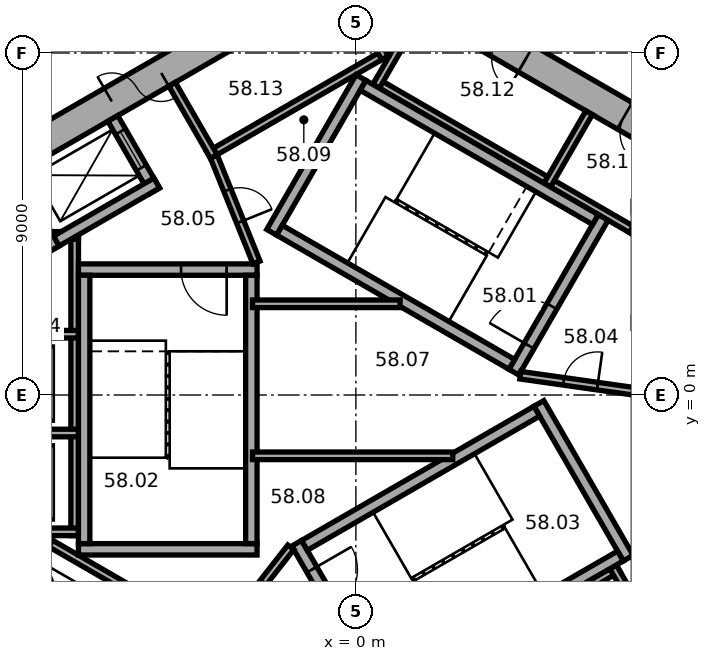
"""IFC4 building model, lengths in metres.
Left out: names, types, materials, properties, quantities, classifications, styles, units other than length and angle.
Written with IfcOpenShell. Run it as: python <this file> out.ifc"""

import sys

from ifc_helpers import new_model, si_unit, direction, frame, frame_2d, origin, place, context, subcontext, project, spatial, rectangle, extrude, element, fill, save


model = new_model("IFC4")
c1 = context("Model", 3, precision=1e-05, world=origin(), true_north=direction((0.0, 1.0)))
c2 = subcontext(c1, "Body", "Model", "MODEL_VIEW")
j1 = project(units=[si_unit("LENGTHUNIT", "METRE"), si_unit("PLANEANGLEUNIT", "RADIAN")], contexts=[c1])
p1 = place(None, origin())
s1 = spatial("IfcSite", under=j1, at=p1, CompositionType="ELEMENT")
p2 = place(p1, origin())
s2 = spatial("IfcBuilding", under=s1, at=p2, CompositionType="ELEMENT")
p3 = place(p2, frame((0.0, 0.0, 236.5)))
s3 = spatial("IfcBuildingStorey", under=s2, at=p3, CompositionType="ELEMENT", Elevation=236.5)
p4 = place(p3, frame((10.1, 5.6, 0.0), z_axis=(0.0, 0.0, 1.0), x_axis=(-0.866023897231, 0.500002609418, 0.0)))
e1 = element("IfcWall", 1, at=p4, inside=s3, PredefinedType="SHEAR", context=c2, shape_type="SweptSolid", body=[
    extrude(rectangle(XDim=11.894, YDim=0.8, at=frame_2d((5.947, 0.0))), origin(), (0.0, 0.0, 1.0), 3.7),
])
p5 = place(p4, frame((2.597, 0.0, 0.0)))
e2 = element("IfcOpeningElement", 2, at=p5, cuts=e1, PredefinedType="OPENING", context=c2, shape_type="SweptSolid", body=[
    extrude(rectangle(XDim=0.9, YDim=2.1, at=frame_2d((0.45, 1.05))), frame((0.0, 0.41, 0.0), z_axis=(0.0, -1.0, 0.0), x_axis=(1.0, 0.0, 0.0)), (0.0, 0.0, 1.0), 0.82),
])
p6 = place(p4, frame((6.497, 0.0, 0.0)))
e3 = element("IfcOpeningElement", 3, at=p6, cuts=e1, PredefinedType="OPENING", context=c2, shape_type="SweptSolid", body=[
    extrude(rectangle(XDim=0.9, YDim=2.1, at=frame_2d((0.45, 1.05))), frame((0.0, 0.41, 0.0), z_axis=(0.0, -1.0, 0.0), x_axis=(1.0, 0.0, 0.0)), (0.0, 0.0, 1.0), 0.82),
])
p7 = place(p3, frame((0.2, 11.547, 0.0), z_axis=(0.0, 0.0, 1.0), x_axis=(-0.866023897231, -0.500002609418, 0.0)))
e4 = element("IfcWall", 4, at=p7, inside=s3, PredefinedType="SHEAR", context=c2, shape_type="SweptSolid", body=[
    extrude(rectangle(XDim=11.894, YDim=0.8, at=frame_2d((5.947, 0.0))), origin(), (0.0, 0.0, 1.0), 3.7),
])
p8 = place(p7, frame((6.147, 0.0, 0.0)))
e5 = element("IfcOpeningElement", 5, at=p8, cuts=e4, PredefinedType="OPENING", context=c2, shape_type="SweptSolid", body=[
    extrude(rectangle(XDim=1.5, YDim=2.1, at=frame_2d((0.75, 1.05))), frame((0.0, 0.41, 0.0), z_axis=(0.0, -1.0, 0.0), x_axis=(1.0, 0.0, 0.0)), (0.0, 0.0, 1.0), 0.82),
])
p9 = place(p7, frame((2.997, 0.0, 0.0)))
e6 = element("IfcOpeningElement", 6, at=p9, cuts=e4, PredefinedType="OPENING", context=c2, shape_type="SweptSolid", body=[
    extrude(rectangle(XDim=0.9, YDim=2.1, at=frame_2d((0.45, 1.05))), frame((0.0, 0.41, 0.0), z_axis=(0.0, -1.0, 0.0), x_axis=(1.0, 0.0, 0.0)), (0.0, 0.0, 1.0), 0.82),
])
p10 = place(p3, frame((7.424, 4.259, 0.0), z_axis=(0.0, 0.0, 1.0), x_axis=(-0.866026010844, 0.49999894854, 0.0)))
e7 = element("IfcWall", 7, at=p10, inside=s3, PredefinedType="PARTITIONING", context=c2, shape_type="SweptSolid", body=[
    extrude(rectangle(XDim=8.0, YDim=0.2, at=frame_2d((4.0, 0.0))), origin(), (0.0, 0.0, 1.0), 3.42),
])
for number, where, z_axis, x_axis in (
    (8, (7.287, 4.222, 0.0), (0.0, 0.0, 1.0), (0.5, 0.866, 0.0)),
    (9, (5.036, 5.522, 0.0), (0.0, 0.0, 1.0), (0.5, 0.866, 0.0)),
    (10, (0.532, 8.122, 0.0), (0.0, 0.0, 1.0), (0.5, 0.866, 0.0)),
):
    element("IfcWall", number, at=place(p3, frame(where, z_axis=z_axis, x_axis=x_axis)), inside=s3, PredefinedType="PARTITIONING", context=c2, shape_type="SweptSolid", body=[
        extrude(rectangle(XDim=2.2, YDim=0.2, at=frame_2d((1.1, 0.0))), origin(), (0.0, 0.0, 1.0), 3.42),
    ])
p11 = place(p3, frame((0.803, 9.009, 0.0), z_axis=(0.0, 0.0, 1.0), x_axis=(-0.866028230842, -0.499995103361, 0.0)))
e11 = element("IfcWall", 11, at=p11, inside=s3, PredefinedType="PARTITIONING", context=c2, shape_type="SweptSolid", body=[
    extrude(rectangle(XDim=5.4, YDim=0.2, at=frame_2d((2.7, 0.0))), origin(), (0.0, 0.0, 1.0), 3.42),
])
p12 = place(p3, frame((0.767, 8.872, 0.0), z_axis=(0.0, 0.0, 1.0), x_axis=(-0.499994660107, 0.866028486751, 0.0)))
e12 = element("IfcWall", 12, at=p12, inside=s3, PredefinedType="PARTITIONING", context=c2, shape_type="SweptSolid", body=[
    extrude(rectangle(XDim=2.2, YDim=0.2, at=frame_2d((1.1, 0.0))), origin(), (0.0, 0.0, 1.0), 3.42),
])
p13 = place(p3, frame((-3.737, 6.272, 0.0), z_axis=(0.0, 0.0, 1.0), x_axis=(-0.50002983664, 0.866008176907, 0.0)))
e13 = element("IfcWall", 13, at=p13, inside=s3, PredefinedType="PARTITIONING", context=c2, shape_type="SweptSolid", body=[
    extrude(rectangle(XDim=2.2, YDim=0.2, at=frame_2d((1.1, 0.0))), origin(), (0.0, 0.0, 1.0), 3.42),
])
p14 = place(p3, frame((-7.4, 4.3, 0.0), z_axis=(0.0, 0.0, 1.0), x_axis=(0.0, -1.0, 0.0)))
e14 = element("IfcWall", 14, at=p14, inside=s3, PredefinedType="PARTITIONING", context=c2, shape_type="SweptSolid", body=[
    extrude(rectangle(XDim=8.0, YDim=0.2, at=frame_2d((4.0, 0.0))), origin(), (0.0, 0.0, 1.0), 3.42),
])
for number, where, z_axis, x_axis in (
    (15, (-7.3, 4.2, 0.0), (0.0, 0.0, 1.0), (-1.0, 0.0, 0.0)),
    (16, (-7.3, 1.6, 0.0), (0.0, 0.0, 1.0), (-1.0, 0.0, 0.0)),
    (17, (-7.3, -1.0, 0.0), (0.0, 0.0, 1.0), (-1.0, 0.0, 0.0)),
    (18, (-7.3, -3.6, 0.0), (0.0, 0.0, 1.0), (-1.0, 0.0, 0.0)),
):
    element("IfcWall", number, at=place(p3, frame(where, z_axis=z_axis, x_axis=x_axis)), inside=s3, PredefinedType="PARTITIONING", context=c2, shape_type="SweptSolid", body=[
        extrude(rectangle(XDim=2.2, YDim=0.2, at=frame_2d((1.1, 0.0))), origin(), (0.0, 0.0, 1.0), 3.42),
    ])
p15 = place(p3, frame((-8.203, -3.809, 0.0), z_axis=(0.0, 0.0, 1.0), x_axis=(0.866028230842, -0.499995103361, 0.0)))
e19 = element("IfcWall", 19, at=p15, inside=s3, PredefinedType="PARTITIONING", context=c2, shape_type="SweptSolid", body=[
    extrude(rectangle(XDim=5.4, YDim=0.2, at=frame_2d((2.7, 0.0))), origin(), (0.0, 0.0, 1.0), 3.42),
])
p16 = place(p3, frame((-8.067, -3.772, 0.0), z_axis=(0.0, 0.0, 1.0), x_axis=(-0.50002983664, -0.866008176907, 0.0)))
e20 = element("IfcWall", 20, at=p16, inside=s3, PredefinedType="PARTITIONING", context=c2, shape_type="SweptSolid", body=[
    extrude(rectangle(XDim=2.2, YDim=0.2, at=frame_2d((1.1, 0.0))), origin(), (0.0, 0.0, 1.0), 3.42),
])
p17 = place(p3, frame((-0.024, -8.559, 0.0), z_axis=(0.0, 0.0, 1.0), x_axis=(0.866026010844, 0.49999894854, 0.0)))
e21 = element("IfcWall", 21, at=p17, inside=s3, PredefinedType="PARTITIONING", context=c2, shape_type="SweptSolid", body=[
    extrude(rectangle(XDim=8.0, YDim=0.2, at=frame_2d((4.0, 0.0))), origin(), (0.0, 0.0, 1.0), 3.42),
])
p18 = place(p3, frame((6.768, -4.522, 0.0), z_axis=(0.0, 0.0, 1.0), x_axis=(0.50002983664, -0.866008176907, 0.0)))
e22 = element("IfcWall", 22, at=p18, inside=s3, PredefinedType="PARTITIONING", context=c2, shape_type="SweptSolid", body=[
    extrude(rectangle(XDim=2.2, YDim=0.2, at=frame_2d((1.1, 0.0))), origin(), (0.0, 0.0, 1.0), 3.42),
])
p19 = place(p3, frame((4.158, 0.602, 0.0), z_axis=(0.0, 0.0, 1.0), x_axis=(0.499977259774, 0.866038532462, 0.0)))
e23 = element("IfcWall", 23, at=p19, inside=s3, PredefinedType="SHEAR", context=c2, shape_type="SweptSolid", body=[
    extrude(rectangle(XDim=4.7, YDim=0.3, at=frame_2d((2.35, 0.0))), origin(), (0.0, 0.0, 1.0), 3.42),
])
p20 = place(p19, frame((0.8, 0.0, 0.0)))
e24 = element("IfcOpeningElement", 24, at=p20, cuts=e23, PredefinedType="OPENING", context=c2, shape_type="SweptSolid", body=[
    extrude(rectangle(XDim=1.2, YDim=2.1, at=frame_2d((0.6, 1.05))), frame((0.0, 0.16, 0.0), z_axis=(0.0, -1.0, 0.0), x_axis=(1.0, 0.0, 0.0)), (0.0, 0.0, 1.0), 0.32),
])
p21 = place(p3, frame((-2.216, 4.282, 0.0), z_axis=(0.0, 0.0, 1.0), x_axis=(0.499977259774, 0.866038532462, 0.0)))
e25 = element("IfcWall", 25, at=p21, inside=s3, PredefinedType="SHEAR", context=c2, shape_type="SweptSolid", body=[
    extrude(rectangle(XDim=4.7, YDim=0.3, at=frame_2d((2.35, 0.0))), origin(), (0.0, 0.0, 1.0), 3.42),
])
for number, where, z_axis, x_axis in (
    (26, (4.103, 0.807, 0.0), (0.0, 0.0, 1.0), (-0.866, 0.5, 0.0)),
    (27, (6.303, 4.617, 0.0), (0.0, 0.0, 1.0), (-0.866, 0.5, 0.0)),
):
    element("IfcWall", number, at=place(p3, frame(where, z_axis=z_axis, x_axis=x_axis)), inside=s3, PredefinedType="SHEAR", context=c2, shape_type="SweptSolid", body=[
        extrude(rectangle(XDim=7.06, YDim=0.3, at=frame_2d((3.53, 0.0))), origin(), (0.0, 0.0, 1.0), 3.42),
    ])
p22 = place(p3, frame((-2.6, 3.3, 0.0), z_axis=(0.0, 0.0, 1.0), x_axis=(-1.0, 0.0, 0.0)))
e28 = element("IfcWall", 28, at=p22, inside=s3, PredefinedType="SHEAR", context=c2, shape_type="SweptSolid", body=[
    extrude(rectangle(XDim=4.7, YDim=0.3, at=frame_2d((2.35, 0.0))), origin(), (0.0, 0.0, 1.0), 3.42),
])
p23 = place(p22, frame((0.8, 0.0, 0.0)))
e29 = element("IfcOpeningElement", 29, at=p23, cuts=e28, PredefinedType="OPENING", context=c2, shape_type="SweptSolid", body=[
    extrude(rectangle(XDim=1.2, YDim=2.1, at=frame_2d((0.6, 1.05))), frame((0.0, 0.16, 0.0), z_axis=(0.0, -1.0, 0.0), x_axis=(1.0, 0.0, 0.0)), (0.0, 0.0, 1.0), 0.32),
])
p24 = place(p3, frame((-2.6, -4.06, 0.0), z_axis=(0.0, 0.0, 1.0), x_axis=(-1.0, 0.0, 0.0)))
e30 = element("IfcWall", 30, at=p24, inside=s3, PredefinedType="SHEAR", context=c2, shape_type="SweptSolid", body=[
    extrude(rectangle(XDim=4.7, YDim=0.3, at=frame_2d((2.35, 0.0))), origin(), (0.0, 0.0, 1.0), 3.42),
])
for number, where, z_axis, x_axis in (
    (31, (-2.75, 3.15, 0.0), (0.0, 0.0, 1.0), (0.0, -1.0, 0.0)),
    (32, (-7.15, 3.15, 0.0), (0.0, 0.0, 1.0), (0.0, -1.0, 0.0)),
):
    element("IfcWall", number, at=place(p3, frame(where, z_axis=z_axis, x_axis=x_axis)), inside=s3, PredefinedType="SHEAR", context=c2, shape_type="SweptSolid", body=[
        extrude(rectangle(XDim=7.06, YDim=0.3, at=frame_2d((3.53, 0.0))), origin(), (0.0, 0.0, 1.0), 3.42),
    ])
p25 = place(p3, frame((-1.558, -3.902, 0.0), z_axis=(0.0, 0.0, 1.0), x_axis=(0.499977259774, -0.866038532462, 0.0)))
e33 = element("IfcWall", 33, at=p25, inside=s3, PredefinedType="SHEAR", context=c2, shape_type="SweptSolid", body=[
    extrude(rectangle(XDim=4.7, YDim=0.3, at=frame_2d((2.35, 0.0))), origin(), (0.0, 0.0, 1.0), 3.42),
])
p26 = place(p25, frame((0.8, 0.0, 0.0)))
e34 = element("IfcOpeningElement", 34, at=p26, cuts=e33, PredefinedType="OPENING", context=c2, shape_type="SweptSolid", body=[
    extrude(rectangle(XDim=1.2, YDim=2.1, at=frame_2d((0.6, 1.05))), frame((0.0, 0.16, 0.0), z_axis=(0.0, -1.0, 0.0), x_axis=(1.0, 0.0, 0.0)), (0.0, 0.0, 1.0), 0.32),
])
p27 = place(p3, frame((4.816, -0.222, 0.0), z_axis=(0.0, 0.0, 1.0), x_axis=(0.499977259774, -0.866038532462, 0.0)))
e35 = element("IfcWall", 35, at=p27, inside=s3, PredefinedType="SHEAR", context=c2, shape_type="SweptSolid", body=[
    extrude(rectangle(XDim=4.7, YDim=0.3, at=frame_2d((2.35, 0.0))), origin(), (0.0, 0.0, 1.0), 3.42),
])
for number, where, z_axis, x_axis in (
    (36, (-1.353, -3.957, 0.0), (0.0, 0.0, 1.0), (0.866, 0.5, 0.0)),
    (37, (0.847, -7.767, 0.0), (0.0, 0.0, 1.0), (0.866, 0.5, 0.0)),
):
    element("IfcWall", number, at=place(p3, frame(where, z_axis=z_axis, x_axis=x_axis)), inside=s3, PredefinedType="SHEAR", context=c2, shape_type="SweptSolid", body=[
        extrude(rectangle(XDim=7.06, YDim=0.3, at=frame_2d((3.53, 0.0))), origin(), (0.0, 0.0, 1.0), 3.42),
    ])
p28 = place(p3, frame((4.327, 0.521, 0.0), z_axis=(0.0, 0.0, 1.0), x_axis=(0.990124376366, -0.14019172346, 0.0)))
e38 = element("IfcWall", 38, at=p28, inside=s3, PredefinedType="PARTITIONING", context=c2, shape_type="SweptSolid", body=[
    extrude(rectangle(XDim=3.002, YDim=0.2, at=frame_2d((1.501, 0.0))), origin(), (0.0, 0.0, 1.0), 3.42),
])
p29 = place(p28, frame((1.15, 0.0, 0.0)))
e39 = element("IfcOpeningElement", 39, at=p29, cuts=e38, PredefinedType="OPENING", context=c2, shape_type="SweptSolid", body=[
    extrude(rectangle(XDim=0.9, YDim=2.1, at=frame_2d((0.45, 1.05))), frame((0.0, 0.11, 0.0), z_axis=(0.0, -1.0, 0.0), x_axis=(1.0, 0.0, 0.0)), (0.0, 0.0, 1.0), 0.22),
])
p30 = place(p3, frame((-5.295, 5.372, 0.0), z_axis=(0.0, 0.0, 1.0), x_axis=(-0.500077893725, 0.86598042715, 0.0)))
e40 = element("IfcWall", 40, at=p30, inside=s3, PredefinedType="SHEAR", context=c2, shape_type="SweptSolid", body=[
    extrude(rectangle(XDim=2.2, YDim=0.3, at=frame_2d((1.1, 0.0))), origin(), (0.0, 0.0, 1.0), 3.42),
])
p31 = place(p30, frame((0.7, 0.0, 0.0)))
e41 = element("IfcOpeningElement", 41, at=p31, cuts=e40, PredefinedType="OPENING", context=c2, shape_type="SweptSolid", body=[
    extrude(rectangle(XDim=1.1, YDim=2.1, at=frame_2d((0.55, 1.05))), frame((0.0, 0.16, 0.0), z_axis=(0.0, -1.0, 0.0), x_axis=(1.0, 0.0, 0.0)), (0.0, 0.0, 1.0), 0.32),
])
p32 = place(p3, frame((-5.24, 5.577, 0.0), z_axis=(0.0, 0.0, 1.0), x_axis=(-0.866014461049, -0.500018952895, 0.0)))
e42 = element("IfcWall", 42, at=p32, inside=s3, PredefinedType="SHEAR", context=c2, shape_type="SweptSolid", body=[
    extrude(rectangle(XDim=3.35, YDim=0.3, at=frame_2d((1.675, 0.0))), origin(), (0.0, 0.0, 1.0), 3.42),
])
p33 = place(p3, frame((-7.937, 3.847, 0.0), z_axis=(0.0, 0.0, 1.0), x_axis=(-0.50002983664, 0.866008176907, 0.0)))
e43 = element("IfcWall", 43, at=p33, inside=s3, PredefinedType="SHEAR", context=c2, shape_type="SweptSolid", body=[
    extrude(rectangle(XDim=2.2, YDim=0.3, at=frame_2d((1.1, 0.0))), origin(), (0.0, 0.0, 1.0), 3.42),
])
p34 = place(p3, frame((-2.615, 3.487, 0.0), z_axis=(0.0, 0.0, 1.0), x_axis=(-0.373576831041, 0.92759924068, 0.0)))
e44 = element("IfcWall", 44, at=p34, inside=s3, PredefinedType="PARTITIONING", context=c2, shape_type="SweptSolid", body=[
    extrude(rectangle(XDim=3.002, YDim=0.2, at=frame_2d((1.501, 0.0))), origin(), (0.0, 0.0, 1.0), 3.42),
])
p35 = place(p34, frame((1.15, 0.0, 0.0)))
e45 = element("IfcOpeningElement", 45, at=p35, cuts=e44, PredefinedType="OPENING", context=c2, shape_type="SweptSolid", body=[
    extrude(rectangle(XDim=0.9, YDim=2.1, at=frame_2d((0.45, 1.05))), frame((0.0, 0.11, 0.0), z_axis=(0.0, -1.0, 0.0), x_axis=(1.0, 0.0, 0.0)), (0.0, 0.0, 1.0), 0.22),
])
p36 = place(p3, frame((-1.712, -4.008, 0.0), z_axis=(0.0, 0.0, 1.0), x_axis=(-0.616549420702, -0.787316208287, 0.0)))
e46 = element("IfcWall", 46, at=p36, inside=s3, PredefinedType="PARTITIONING", context=c2, shape_type="SweptSolid", body=[
    extrude(rectangle(XDim=3.002, YDim=0.2, at=frame_2d((1.501, 0.0))), origin(), (0.0, 0.0, 1.0), 3.42),
])
p37 = place(p36, frame((1.15, 0.0, 0.0)))
e47 = element("IfcOpeningElement", 47, at=p37, cuts=e46, PredefinedType="OPENING", context=c2, shape_type="SweptSolid", body=[
    extrude(rectangle(XDim=0.9, YDim=2.1, at=frame_2d((0.45, 1.05))), frame((0.0, 0.11, 0.0), z_axis=(0.0, -1.0, 0.0), x_axis=(1.0, 0.0, 0.0)), (0.0, 0.0, 1.0), 0.22),
])
p38 = place(p3, frame((-2.72, -1.6, 0.0), z_axis=(0.0, 0.0, 1.0), x_axis=(1.0, 0.0, 0.0)))
e48 = element("IfcWall", 48, at=p38, inside=s3, PredefinedType="PARTITIONING", context=c2, shape_type="SweptSolid", body=[
    extrude(rectangle(XDim=5.269, YDim=0.2, at=frame_2d((2.634, 0.0))), origin(), (0.0, 0.0, 1.0), 3.42),
])
p39 = place(p3, frame((-2.72, 2.4, 0.0), z_axis=(0.0, 0.0, 1.0), x_axis=(1.0, 0.0, 0.0)))
e49 = element("IfcWall", 49, at=p39, inside=s3, PredefinedType="PARTITIONING", context=c2, shape_type="SweptSolid", body=[
    extrude(rectangle(XDim=3.883, YDim=0.2, at=frame_2d((1.941, 0.0))), origin(), (0.0, 0.0, 1.0), 3.42),
])
p40 = place(p8, origin())
e50 = element("IfcDoor", 50, at=p40, inside=s3, OperationType="DOUBLE_DOOR_SINGLE_SWING", PredefinedType="DOOR", context=c2, shape_type="SweptSolid", body=[
    extrude(rectangle(XDim=1.5, YDim=2.1, at=frame_2d((0.75, 1.05))), frame((0.0, 0.025, 0.0), z_axis=(0.0, -1.0, 0.0), x_axis=(1.0, 0.0, 0.0)), (0.0, 0.0, 1.0), 0.05),
])
fill(e5, e50)
p41 = place(p20, origin())
e51 = element("IfcDoor", 51, at=p41, inside=s3, OperationType="SINGLE_SWING_RIGHT", PredefinedType="DOOR", context=c2, shape_type="SweptSolid", body=[
    extrude(rectangle(XDim=1.2, YDim=2.1, at=frame_2d((0.6, 1.05))), frame((0.0, 0.025, 0.0), z_axis=(0.0, -1.0, 0.0), x_axis=(1.0, 0.0, 0.0)), (0.0, 0.0, 1.0), 0.05),
])
fill(e24, e51)
p42 = place(p23, origin())
e52 = element("IfcDoor", 52, at=p42, inside=s3, OperationType="SINGLE_SWING_RIGHT", PredefinedType="DOOR", context=c2, shape_type="SweptSolid", body=[
    extrude(rectangle(XDim=1.2, YDim=2.1, at=frame_2d((0.6, 1.05))), frame((0.0, 0.025, 0.0), z_axis=(0.0, -1.0, 0.0), x_axis=(1.0, 0.0, 0.0)), (0.0, 0.0, 1.0), 0.05),
])
fill(e29, e52)
p43 = place(p26, origin())
e53 = element("IfcDoor", 53, at=p43, inside=s3, OperationType="SINGLE_SWING_RIGHT", PredefinedType="DOOR", context=c2, shape_type="SweptSolid", body=[
    extrude(rectangle(XDim=1.2, YDim=2.1, at=frame_2d((0.6, 1.05))), frame((0.0, 0.025, 0.0), z_axis=(0.0, -1.0, 0.0), x_axis=(1.0, 0.0, 0.0)), (0.0, 0.0, 1.0), 0.05),
])
fill(e34, e53)
p44 = place(p29, origin())
e54 = element("IfcDoor", 54, at=p44, inside=s3, OperationType="SINGLE_SWING_LEFT", PredefinedType="DOOR", context=c2, shape_type="SweptSolid", body=[
    extrude(rectangle(XDim=0.9, YDim=2.1, at=frame_2d((0.45, 1.05))), frame((0.0, 0.025, 0.0), z_axis=(0.0, -1.0, 0.0), x_axis=(1.0, 0.0, 0.0)), (0.0, 0.0, 1.0), 0.05),
])
fill(e39, e54)
p45 = place(p35, origin())
e55 = element("IfcDoor", 55, at=p45, inside=s3, OperationType="SINGLE_SWING_LEFT", PredefinedType="DOOR", context=c2, shape_type="SweptSolid", body=[
    extrude(rectangle(XDim=0.9, YDim=2.1, at=frame_2d((0.45, 1.05))), frame((0.0, 0.025, 0.0), z_axis=(0.0, -1.0, 0.0), x_axis=(1.0, 0.0, 0.0)), (0.0, 0.0, 1.0), 0.05),
])
fill(e45, e55)
p46 = place(p37, origin())
e56 = element("IfcDoor", 56, at=p46, inside=s3, OperationType="SINGLE_SWING_LEFT", PredefinedType="DOOR", context=c2, shape_type="SweptSolid", body=[
    extrude(rectangle(XDim=0.9, YDim=2.1, at=frame_2d((0.45, 1.05))), frame((0.0, 0.025, 0.0), z_axis=(0.0, -1.0, 0.0), x_axis=(1.0, 0.0, 0.0)), (0.0, 0.0, 1.0), 0.05),
])
fill(e47, e56)
p47 = place(p5, origin())
e57 = element("IfcDoor", 57, at=p47, inside=s3, OperationType="SINGLE_SWING_LEFT", PredefinedType="DOOR", context=c2, shape_type="SweptSolid", body=[
    extrude(rectangle(XDim=0.9, YDim=2.1, at=frame_2d((0.45, 1.05))), frame((0.0, 0.025, 0.0), z_axis=(0.0, -1.0, 0.0), x_axis=(1.0, 0.0, 0.0)), (0.0, 0.0, 1.0), 0.05),
])
fill(e2, e57)
p48 = place(p6, origin())
e58 = element("IfcDoor", 58, at=p48, inside=s3, OperationType="SINGLE_SWING_LEFT", PredefinedType="DOOR", context=c2, shape_type="SweptSolid", body=[
    extrude(rectangle(XDim=0.9, YDim=2.1, at=frame_2d((0.45, 1.05))), frame((0.0, 0.025, 0.0), z_axis=(0.0, -1.0, 0.0), x_axis=(1.0, 0.0, 0.0)), (0.0, 0.0, 1.0), 0.05),
])
fill(e3, e58)
p49 = place(p31, origin())
e59 = element("IfcDoor", 59, at=p49, inside=s3, OperationType="DOUBLE_DOOR_SLIDING", PredefinedType="DOOR", context=c2, shape_type="SweptSolid", body=[
    extrude(rectangle(XDim=1.1, YDim=2.1, at=frame_2d((0.55, 1.05))), frame((0.0, 0.025, 0.0), z_axis=(0.0, -1.0, 0.0), x_axis=(1.0, 0.0, 0.0)), (0.0, 0.0, 1.0), 0.05),
])
fill(e41, e59)
save(model, sys.argv[1])
